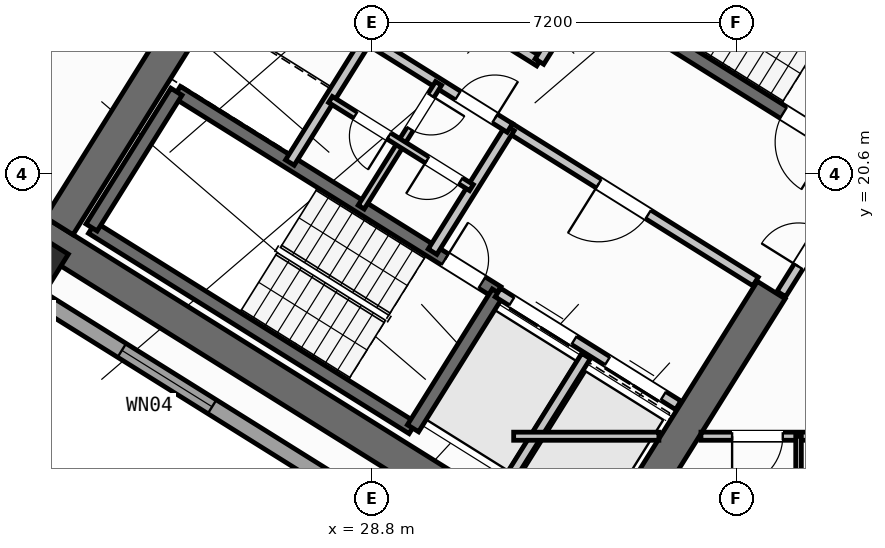
"""IFC4 building model, lengths in metres.
Left out: names, types, materials, properties, quantities, classifications, styles, units other than length and angle.
Written with IfcOpenShell. Run it as: python <this file> out.ifc"""

import sys

from ifc_helpers import new_model, si_unit, direction, frame, frame_2d, origin, origin_2d, place, context, subcontext, project, spatial, rectangle, hollow_rectangle, extrude, source, transform, mapped, element, fill, save


model = new_model("IFC4")
c1 = context("Model", 3, precision=1e-05, world=origin(), true_north=direction((0.0, 1.0)))
c2 = subcontext(c1, "Body", "Model", "MODEL_VIEW")
j1 = project(units=[si_unit("LENGTHUNIT", "METRE"), si_unit("PLANEANGLEUNIT", "RADIAN")], contexts=[c1])
p1 = place(None, origin())
s1 = spatial("IfcSite", under=j1, at=p1, CompositionType="ELEMENT")
p2 = place(p1, origin())
s2 = spatial("IfcBuilding", under=s1, at=p2, CompositionType="ELEMENT")
p3 = place(p2, frame((0.0, 0.0, 90.0)))
s3 = spatial("IfcBuildingStorey", under=s2, at=p3, CompositionType="ELEMENT", Elevation=90.0)
p4 = place(p3, frame((33.409, 12.45, 0.0), z_axis=(0.0, 0.0, 1.0), x_axis=(-0.848051132073, 0.529914405721, 0.0)))
e1 = element("IfcWall", 1, at=p4, inside=s3, PredefinedType="SHEAR", context=c2, shape_type="SweptSolid", body=[
    extrude(rectangle(XDim=13.24, YDim=0.65, at=frame_2d((6.62, 0.0))), origin(), (0.0, 0.0, 1.0), 3.35),
])
p5 = place(p3, frame((36.683, 18.304, 0.0), z_axis=(0.0, 0.0, 1.0), x_axis=(-0.529899109053, -0.848060690178, 0.0)))
e2 = element("IfcWall", 2, at=p5, inside=s3, PredefinedType="SHEAR", context=c2, shape_type="SweptSolid", body=[
    extrude(rectangle(XDim=6.375, YDim=0.65, at=frame_2d((3.188, 0.0))), origin(), (0.0, 0.0, 1.0), 3.35),
])
p6 = place(p3, frame((26.007, 24.976, 0.0), z_axis=(0.0, 0.0, 1.0), x_axis=(-0.529916319127, -0.848049936456, 0.0)))
e3 = element("IfcWall", 3, at=p6, inside=s3, PredefinedType="SHEAR", context=c2, shape_type="SweptSolid", body=[
    extrude(rectangle(XDim=6.375, YDim=0.65, at=frame_2d((3.188, 0.0))), origin(), (0.0, 0.0, 1.0), 3.35),
])
m1 = source(origin(), c2, "Body", "SweptSolid", [
    extrude(hollow_rectangle(XDim=0.9, YDim=0.9, WallThickness=0.036, at=origin_2d()), origin(), (0.0, 0.0, 1.0), 3.6),
])
p7 = place(p3, frame((22.191, 18.87, 0.0), z_axis=(0.0, 0.0, 1.0), x_axis=(-0.848048096156, 0.529919264233, 0.0)))
e4 = element("IfcColumn", 4, at=p7, inside=s3, PredefinedType="COLUMN", context=c2, shape_type="MappedRepresentation", body=[
    mapped(m1, transform((0.0, 0.0, 0.0), scale=1.0)),
])
p8 = place(p3, frame((31.76, 12.183, 0.0), z_axis=(0.0, 0.0, 1.0), x_axis=(-0.848047074256, 0.529920899612, 0.0)))
e5 = element("IfcWall", 5, at=p8, inside=s3, PredefinedType="STANDARD", context=c2, shape_type="SweptSolid", body=[
    extrude(rectangle(XDim=30.652, YDim=0.32, at=frame_2d((15.326, 0.0))), origin(), (0.0, 0.0, 1.0), 3.35),
])
p9 = place(p8, frame((15.153, 0.0, 0.0)))
e6 = element("IfcOpeningElement", 6, at=p9, cuts=e5, PredefinedType="OPENING", context=c2, shape_type="SweptSolid", body=[
    extrude(rectangle(XDim=1.2, YDim=2.15, at=frame_2d((0.6, 1.075))), frame((0.0, 0.17, 0.0), z_axis=(0.0, -1.0, 0.0), x_axis=(1.0, 0.0, 0.0)), (0.0, 0.0, 1.0), 0.34),
])
p10 = place(p8, frame((2.002, 0.0, 0.8)))
e7 = element("IfcOpeningElement", 7, at=p10, cuts=e5, PredefinedType="OPENING", context=c2, shape_type="SweptSolid", body=[
    extrude(rectangle(XDim=2.1, YDim=1.55, at=frame_2d((1.05, 0.775))), frame((0.0, 0.17, 0.0), z_axis=(0.0, -1.0, 0.0), x_axis=(1.0, 0.0, 0.0)), (0.0, 0.0, 1.0), 0.34),
])
p11 = place(p8, frame((7.206, 0.0, 0.8)))
e8 = element("IfcOpeningElement", 8, at=p11, cuts=e5, PredefinedType="OPENING", context=c2, shape_type="SweptSolid", body=[
    extrude(rectangle(XDim=2.1, YDim=1.55, at=frame_2d((1.05, 0.775))), frame((0.0, 0.17, 0.0), z_axis=(0.0, -1.0, 0.0), x_axis=(1.0, 0.0, 0.0)), (0.0, 0.0, 1.0), 0.34),
])
p12 = place(p8, frame((12.648, 0.0, 1.0)))
e9 = element("IfcOpeningElement", 9, at=p12, cuts=e5, PredefinedType="OPENING", context=c2, shape_type="SweptSolid", body=[
    extrude(rectangle(XDim=0.9, YDim=1.25, at=frame_2d((0.45, 0.625))), frame((0.0, 0.17, 0.0), z_axis=(0.0, -1.0, 0.0), x_axis=(1.0, 0.0, 0.0)), (0.0, 0.0, 1.0), 0.34),
])
p13 = place(p8, frame((27.974, 0.0, 0.95)))
e10 = element("IfcOpeningElement", 10, at=p13, cuts=e5, PredefinedType="OPENING", context=c2, shape_type="SweptSolid", body=[
    extrude(rectangle(XDim=1.2, YDim=1.4, at=frame_2d((0.6, 0.7))), frame((0.0, 0.17, 0.0), z_axis=(0.0, -1.0, 0.0), x_axis=(1.0, 0.0, 0.0)), (0.0, 0.0, 1.0), 0.34),
])
p14 = place(p8, frame((18.347, 0.0, 1.0)))
e11 = element("IfcOpeningElement", 11, at=p14, cuts=e5, PredefinedType="OPENING", context=c2, shape_type="SweptSolid", body=[
    extrude(rectangle(XDim=0.9, YDim=1.25, at=frame_2d((0.45, 0.625))), frame((0.0, 0.17, 0.0), z_axis=(0.0, -1.0, 0.0), x_axis=(1.0, 0.0, 0.0)), (0.0, 0.0, 1.0), 0.34),
])
p15 = place(p8, frame((20.931, 0.0, 1.0)))
e12 = element("IfcOpeningElement", 12, at=p15, cuts=e5, PredefinedType="OPENING", context=c2, shape_type="SweptSolid", body=[
    extrude(rectangle(XDim=0.65, YDim=1.15, at=frame_2d((0.325, 0.575))), frame((0.0, 0.17, 0.0), z_axis=(0.0, -1.0, 0.0), x_axis=(1.0, 0.0, 0.0)), (0.0, 0.0, 1.0), 0.34),
])
p16 = place(p8, frame((22.938, 0.0, 1.0)))
e13 = element("IfcOpeningElement", 13, at=p16, cuts=e5, PredefinedType="OPENING", context=c2, shape_type="SweptSolid", body=[
    extrude(rectangle(XDim=0.9, YDim=1.25, at=frame_2d((0.45, 0.625))), frame((0.0, 0.17, 0.0), z_axis=(0.0, -1.0, 0.0), x_axis=(1.0, 0.0, 0.0)), (0.0, 0.0, 1.0), 0.34),
])
p17 = place(p8, frame((25.069, 0.0, 1.0)))
e14 = element("IfcOpeningElement", 14, at=p17, cuts=e5, PredefinedType="OPENING", context=c2, shape_type="SweptSolid", body=[
    extrude(rectangle(XDim=0.9, YDim=1.25, at=frame_2d((0.45, 0.625))), frame((0.0, 0.17, 0.0), z_axis=(0.0, -1.0, 0.0), x_axis=(1.0, 0.0, 0.0)), (0.0, 0.0, 1.0), 0.34),
])
p18 = place(p3, frame((29.605, 15.581, 0.0), z_axis=(0.0, 0.0, 1.0), x_axis=(-0.848036911448, 0.529937163087, 0.0)))
e15 = element("IfcWall", 15, at=p18, inside=s3, PredefinedType="SHEAR", context=c2, shape_type="SweptSolid", body=[
    extrude(rectangle(XDim=7.46, YDim=0.26, at=frame_2d((3.73, 0.0))), origin(), (0.0, 0.0, 1.0), 3.35),
])
p19 = place(p3, frame((31.28, 18.261, 0.0), z_axis=(0.0, 0.0, 1.0), x_axis=(-0.848051618787, 0.529913626805, 0.0)))
e16 = element("IfcWall", 16, at=p19, inside=s3, PredefinedType="SHEAR", context=c2, shape_type="SweptSolid", body=[
    extrude(rectangle(XDim=7.46, YDim=0.26, at=frame_2d((3.73, 0.0))), origin(), (0.0, 0.0, 1.0), 3.35),
])
p20 = place(p19, frame((0.36, 0.0, 0.0)))
e17 = element("IfcOpeningElement", 17, at=p20, cuts=e16, PredefinedType="OPENING", context=c2, shape_type="SweptSolid", body=[
    extrude(rectangle(XDim=0.86, YDim=2.05, at=frame_2d((0.43, 1.025))), frame((0.0, 0.14, 0.0), z_axis=(0.0, -1.0, 0.0), x_axis=(1.0, 0.0, 0.0)), (0.0, 0.0, 1.0), 0.28),
])
p21 = place(p3, frame((31.288, 18.256, 0.0), z_axis=(0.0, 0.0, 1.0), x_axis=(-0.529943379326, -0.848033026897, 0.0)))
e18 = element("IfcWall", 18, at=p21, inside=s3, PredefinedType="SHEAR", context=c2, shape_type="SweptSolid", body=[
    extrude(rectangle(XDim=3.16, YDim=0.26, at=frame_2d((1.58, 0.0))), origin(), (0.0, 0.0, 1.0), 3.35),
])
p22 = place(p3, frame((24.945, 22.22, 0.0), z_axis=(0.0, 0.0, 1.0), x_axis=(-0.529908658664, -0.84805472316, 0.0)))
e19 = element("IfcWall", 19, at=p22, inside=s3, PredefinedType="SHEAR", context=c2, shape_type="SweptSolid", body=[
    extrude(rectangle(XDim=3.16, YDim=0.26, at=frame_2d((1.58, 0.0))), origin(), (0.0, 0.0, 1.0), 3.35),
])
p23 = place(p3, frame((38.046, 21.108, 0.0), z_axis=(0.0, 0.0, 1.0), x_axis=(-0.848054434086, 0.529909121291, 0.0)))
e20 = element("IfcWall", 20, at=p23, inside=s3, PredefinedType="SHEAR", context=c2, shape_type="SweptSolid", body=[
    extrude(rectangle(XDim=7.33, YDim=0.26, at=frame_2d((3.665, 0.0))), origin(), (0.0, 0.0, 1.0), 3.35),
])
p24 = place(p23, frame((0.22, 0.0, 0.0)))
e21 = element("IfcOpeningElement", 21, at=p24, cuts=e20, PredefinedType="OPENING", context=c2, shape_type="SweptSolid", body=[
    extrude(rectangle(XDim=1.1, YDim=2.1, at=frame_2d((0.55, 1.05))), frame((0.0, 0.14, 0.0), z_axis=(0.0, -1.0, 0.0), x_axis=(1.0, 0.0, 0.0)), (0.0, 0.0, 1.0), 0.28),
])
p25 = place(p3, frame((34.848, 16.031, 0.0), z_axis=(0.0, 0.0, 1.0), x_axis=(-0.848044042236, 0.529925751807, 0.0)))
e22 = element("IfcWall", 22, at=p25, inside=s3, PredefinedType="STANDARD", context=c2, shape_type="SweptSolid", body=[
    extrude(rectangle(XDim=4.198, YDim=0.2, at=frame_2d((2.099, 0.0))), origin(), (0.0, 0.0, 1.0), 3.34),
])
p26 = place(p25, frame((0.348, 0.0, 0.0)))
e23 = element("IfcOpeningElement", 23, at=p26, cuts=e22, PredefinedType="OPENING", context=c2, shape_type="SweptSolid", body=[
    extrude(rectangle(XDim=1.3, YDim=2.2, at=frame_2d((0.65, 1.1))), frame((0.0, 0.11, 0.0), z_axis=(0.0, -1.0, 0.0), x_axis=(1.0, 0.0, 0.0)), (0.0, 0.0, 1.0), 0.22),
])
p27 = place(p25, frame((2.423, 0.0, 0.0)))
e24 = element("IfcOpeningElement", 24, at=p27, cuts=e22, PredefinedType="OPENING", context=c2, shape_type="SweptSolid", body=[
    extrude(rectangle(XDim=1.45, YDim=2.25, at=frame_2d((0.725, 1.125))), frame((0.0, 0.11, 0.0), z_axis=(0.0, -1.0, 0.0), x_axis=(1.0, 0.0, 0.0)), (0.0, 0.0, 1.0), 0.22),
])
p28 = place(p3, frame((36.374, 18.474, 0.0), z_axis=(0.0, 0.0, 1.0), x_axis=(-0.848051071577, 0.529914502535, 0.0)))
e25 = element("IfcWall", 25, at=p28, inside=s3, PredefinedType="STANDARD", context=c2, shape_type="SweptSolid", body=[
    extrude(rectangle(XDim=5.718, YDim=0.2, at=frame_2d((2.859, 0.0))), origin(), (0.0, 0.0, 1.0), 3.34),
])
p29 = place(p28, frame((2.498, 0.0, 0.0)))
e26 = element("IfcOpeningElement", 26, at=p29, cuts=e25, PredefinedType="OPENING", context=c2, shape_type="SweptSolid", body=[
    extrude(rectangle(XDim=1.15, YDim=2.1, at=frame_2d((0.575, 1.05))), frame((0.0, 0.11, 0.0), z_axis=(0.0, -1.0, 0.0), x_axis=(1.0, 0.0, 0.0)), (0.0, 0.0, 1.0), 0.22),
])
p30 = place(p3, frame((32.108, 22.814, 0.0), z_axis=(0.0, 0.0, 1.0), x_axis=(-0.848042229521, 0.529928652696, 0.0)))
e27 = element("IfcWall", 27, at=p30, inside=s3, PredefinedType="STANDARD", context=c2, shape_type="SweptSolid", body=[
    extrude(rectangle(XDim=5.62, YDim=0.2, at=frame_2d((2.81, 0.0))), origin(), (0.0, 0.0, 1.0), 3.34),
])
p31 = place(p3, frame((32.982, 24.213, 0.0), z_axis=(0.0, 0.0, 1.0), x_axis=(-0.529839334948, -0.84809803628, 0.0)))
e28 = element("IfcWall", 28, at=p31, inside=s3, PredefinedType="STANDARD", context=c2, shape_type="SweptSolid", body=[
    extrude(rectangle(XDim=1.65, YDim=0.2, at=frame_2d((0.825, 0.0))), origin(), (0.0, 0.0, 1.0), 3.34),
])
p32 = place(p3, frame((33.029, 17.003, 0.0), z_axis=(0.0, 0.0, 1.0), x_axis=(-0.529916267533, -0.848049968695, 0.0)))
e29 = element("IfcWall", 29, at=p32, inside=s3, PredefinedType="STANDARD", context=c2, shape_type="SweptSolid", body=[
    extrude(rectangle(XDim=2.92, YDim=0.2, at=frame_2d((1.46, 0.0))), origin(), (0.0, 0.0, 1.0), 3.34),
])
for number, where, z_axis, x_axis in (
    (30, (31.525, 21.504, 0.0), (0.0, 0.0, 1.0), (-0.53, -0.848, 0.0)),
    (31, (28.71, 23.263, 0.0), (0.0, 0.0, 1.0), (-0.53, -0.848, 0.0)),
):
    element("IfcWall", number, at=place(p3, frame(where, z_axis=z_axis, x_axis=x_axis)), inside=s3, PredefinedType="STANDARD", context=c2, shape_type="SweptSolid", body=[
        extrude(rectangle(XDim=2.88, YDim=0.2, at=frame_2d((1.44, 0.0))), origin(), (0.0, 0.0, 1.0), 3.34),
    ])
p33 = place(p3, frame((31.525, 21.504, 0.0), z_axis=(0.0, 0.0, 1.0), x_axis=(-0.848044998614, 0.529924221305, 0.0)))
e32 = element("IfcWall", 32, at=p33, inside=s3, PredefinedType="STANDARD", context=c2, shape_type="SweptSolid", body=[
    extrude(rectangle(XDim=6.168, YDim=0.2, at=frame_2d((3.084, 0.0))), origin(), (0.0, 0.0, 1.0), 3.34),
])
p34 = place(p33, frame((4.4, 0.0, 0.0)))
e33 = element("IfcOpeningElement", 33, at=p34, cuts=e32, PredefinedType="OPENING", context=c2, shape_type="SweptSolid", body=[
    extrude(rectangle(XDim=0.86, YDim=2.05, at=frame_2d((0.43, 1.025))), frame((0.0, 0.11, 0.0), z_axis=(0.0, -1.0, 0.0), x_axis=(1.0, 0.0, 0.0)), (0.0, 0.0, 1.0), 0.22),
])
p35 = place(p33, frame((0.35, 0.0, 0.0)))
e34 = element("IfcOpeningElement", 34, at=p35, cuts=e32, PredefinedType="OPENING", context=c2, shape_type="SweptSolid", body=[
    extrude(rectangle(XDim=0.86, YDim=2.05, at=frame_2d((0.43, 1.025))), frame((0.0, 0.11, 0.0), z_axis=(0.0, -1.0, 0.0), x_axis=(1.0, 0.0, 0.0)), (0.0, 0.0, 1.0), 0.22),
])
p36 = place(p3, frame((30.117, 22.384, 0.0), z_axis=(0.0, 0.0, 1.0), x_axis=(-0.529951914384, -0.848027693204, 0.0)))
e35 = element("IfcWall", 35, at=p36, inside=s3, PredefinedType="PLUMBINGWALL", context=c2, shape_type="SweptSolid", body=[
    extrude(rectangle(XDim=1.4, YDim=0.14, at=frame_2d((0.7, 0.0))), origin(), (0.0, 0.0, 1.0), 3.34),
])
p37 = place(p36, frame((0.28, 0.0, 0.0)))
e36 = element("IfcOpeningElement", 36, at=p37, cuts=e35, PredefinedType="OPENING", context=c2, shape_type="SweptSolid", body=[
    extrude(rectangle(XDim=0.78, YDim=2.05, at=frame_2d((0.39, 1.025))), frame((0.0, 0.08, 0.0), z_axis=(0.0, -1.0, 0.0), x_axis=(1.0, 0.0, 0.0)), (0.0, 0.0, 1.0), 0.16),
])
p38 = place(p3, frame((29.375, 21.196, 0.0), z_axis=(0.0, 0.0, 1.0), x_axis=(-0.529865479138, -0.848081702443, 0.0)))
e37 = element("IfcWall", 37, at=p38, inside=s3, PredefinedType="PLUMBINGWALL", context=c2, shape_type="SweptSolid", body=[
    extrude(rectangle(XDim=1.48, YDim=0.14, at=frame_2d((0.74, 0.0))), origin(), (0.0, 0.0, 1.0), 3.34),
])
p39 = place(p3, frame((30.766, 20.327, 0.0), z_axis=(0.0, 0.0, 1.0), x_axis=(-0.848052663127, 0.529911955482, 0.0)))
e38 = element("IfcWall", 38, at=p39, inside=s3, PredefinedType="PLUMBINGWALL", context=c2, shape_type="SweptSolid", body=[
    extrude(rectangle(XDim=3.28, YDim=0.14, at=frame_2d((1.64, 0.0))), origin(), (0.0, 0.0, 1.0), 3.34),
])
p40 = place(p39, frame((0.25, 0.0, 0.0)))
e39 = element("IfcOpeningElement", 39, at=p40, cuts=e38, PredefinedType="OPENING", context=c2, shape_type="SweptSolid", body=[
    extrude(rectangle(XDim=0.78, YDim=2.05, at=frame_2d((0.39, 1.025))), frame((0.0, 0.08, 0.0), z_axis=(0.0, -1.0, 0.0), x_axis=(1.0, 0.0, 0.0)), (0.0, 0.0, 1.0), 0.16),
])
p41 = place(p39, frame((1.92, 0.0, 0.0)))
e40 = element("IfcOpeningElement", 40, at=p41, cuts=e38, PredefinedType="OPENING", context=c2, shape_type="SweptSolid", body=[
    extrude(rectangle(XDim=0.78, YDim=2.05, at=frame_2d((0.39, 1.025))), frame((0.0, 0.08, 0.0), z_axis=(0.0, -1.0, 0.0), x_axis=(1.0, 0.0, 0.0)), (0.0, 0.0, 1.0), 0.16),
])
p42 = place(p3, frame((25.807, 29.582, 0.0), z_axis=(0.0, 0.0, 1.0), x_axis=(-0.529920357077, -0.848047413271, 0.0)))
e41 = element("IfcWall", 41, at=p42, inside=s3, PredefinedType="PARTITIONING", context=c2, shape_type="SweptSolid", body=[
    extrude(rectangle(XDim=11.45, YDim=0.16, at=frame_2d((5.725, 0.0))), origin(), (0.0, 0.0, 1.0), 3.34),
])
p43 = place(p3, frame((38.451, 20.737, 0.0), z_axis=(0.0, 0.0, 1.0), x_axis=(-0.529924799939, -0.848044637038, 0.0)))
e42 = element("IfcWall", 42, at=p43, inside=s3, PredefinedType="STANDARD", context=c2, shape_type="SweptSolid", body=[
    extrude(rectangle(XDim=2.96, YDim=0.2, at=frame_2d((1.48, 0.0))), origin(), (0.0, 0.0, 1.0), 3.34),
])
p44 = place(p43, frame((1.46, 0.0, 0.0)))
e43 = element("IfcOpeningElement", 43, at=p44, cuts=e42, PredefinedType="OPENING", context=c2, shape_type="SweptSolid", body=[
    extrude(rectangle(XDim=0.86, YDim=2.05, at=frame_2d((0.43, 1.025))), frame((0.0, 0.11, 0.0), z_axis=(0.0, -1.0, 0.0), x_axis=(1.0, 0.0, 0.0)), (0.0, 0.0, 1.0), 0.22),
])
p45 = place(p3, frame((31.6, 15.42, 0.0), z_axis=(0.0, 0.0, 1.0), x_axis=(1.0, 0.0, 0.0)))
e44 = element("IfcWall", 44, at=p45, inside=s3, PredefinedType="PARTITIONING", context=c2, shape_type="SweptSolid", body=[
    extrude(rectangle(XDim=2.866, YDim=0.16, at=frame_2d((1.433, 0.0))), origin(), (0.0, 0.0, 1.0), 3.34),
])
p46 = place(p3, frame((35.296, 15.42, 0.0), z_axis=(0.0, 0.0, 1.0), x_axis=(1.0, 0.0, 0.0)))
e45 = element("IfcWall", 45, at=p46, inside=s3, PredefinedType="PARTITIONING", context=c2, shape_type="SweptSolid", body=[
    extrude(rectangle(XDim=15.311, YDim=0.16, at=frame_2d((7.655, 0.0))), origin(), (0.0, 0.0, 1.0), 3.34),
])
p47 = place(p46, frame((0.615, 0.0, 0.0)))
e46 = element("IfcOpeningElement", 46, at=p47, cuts=e45, PredefinedType="OPENING", context=c2, shape_type="SweptSolid", body=[
    extrude(rectangle(XDim=1.0, YDim=2.1, at=frame_2d((0.5, 1.05))), frame((0.0, 0.09, 0.0), z_axis=(0.0, -1.0, 0.0), x_axis=(1.0, 0.0, 0.0)), (0.0, 0.0, 1.0), 0.18),
])
p48 = place(p46, frame((9.035, 0.0, 0.0)))
e47 = element("IfcOpeningElement", 47, at=p48, cuts=e45, PredefinedType="OPENING", context=c2, shape_type="SweptSolid", body=[
    extrude(rectangle(XDim=1.0, YDim=2.1, at=frame_2d((0.5, 1.05))), frame((0.0, 0.09, 0.0), z_axis=(0.0, -1.0, 0.0), x_axis=(1.0, 0.0, 0.0)), (0.0, 0.0, 1.0), 0.18),
])
p49 = place(p3, frame((37.222, 1.96, 0.0), z_axis=(0.0, 0.0, 1.0), x_axis=(0.0, 1.0, 0.0)))
e48 = element("IfcWall", 48, at=p49, inside=s3, PredefinedType="PARTITIONING", context=c2, shape_type="SweptSolid", body=[
    extrude(rectangle(XDim=13.46, YDim=0.11, at=frame_2d((6.73, 0.0))), origin(), (0.0, 0.0, 1.0), 3.34),
])
p50 = place(p49, frame((5.2, 0.0, 0.0)))
e49 = element("IfcOpeningElement", 49, at=p50, cuts=e48, PredefinedType="OPENING", context=c2, shape_type="SweptSolid", body=[
    extrude(rectangle(XDim=0.92, YDim=2.08, at=frame_2d((0.46, 1.04))), frame((0.0, 0.065, 0.0), z_axis=(0.0, -1.0, 0.0), x_axis=(1.0, 0.0, 0.0)), (0.0, 0.0, 1.0), 0.13),
])
p51 = place(p49, frame((10.89, 0.0, 0.0)))
e50 = element("IfcOpeningElement", 50, at=p51, cuts=e48, PredefinedType="OPENING", context=c2, shape_type="SweptSolid", body=[
    extrude(rectangle(XDim=0.88, YDim=2.08, at=frame_2d((0.44, 1.04))), frame((0.0, 0.065, 0.0), z_axis=(0.0, -1.0, 0.0), x_axis=(1.0, 0.0, 0.0)), (0.0, 0.0, 1.0), 0.13),
])
m2 = source(origin(), c2, "Body", "SweptSolid", [
    extrude(rectangle(XDim=2.1, YDim=1.55, at=frame_2d((1.05, 0.775))), frame((0.0, 0.03, 0.0), z_axis=(0.0, -1.0, 0.0), x_axis=(1.0, 0.0, 0.0)), (0.0, 0.0, 1.0), 0.06),
])
p52 = place(p11, origin())
e51 = element("IfcWindow", 51, at=p52, inside=s3, PartitioningType="SINGLE_PANEL", PredefinedType="WINDOW", context=c2, shape_type="MappedRepresentation", body=[
    mapped(m2, transform((0.0, 0.0, 0.0), scale=1.0)),
])
fill(e8, e51)
m3 = source(origin(), c2, "Body", "SweptSolid", [
    extrude(rectangle(XDim=0.86, YDim=2.05, at=frame_2d((0.43, 1.025))), frame((0.0, 0.025, 0.0), z_axis=(0.0, -1.0, 0.0), x_axis=(1.0, 0.0, 0.0)), (0.0, 0.0, 1.0), 0.05),
])
p53 = place(p20, frame((0.86, 0.0, 0.0), z_axis=(0.0, 0.0, 1.0), x_axis=(-1.0, 0.0, 0.0)))
e52 = element("IfcDoor", 52, at=p53, inside=s3, OperationType="SINGLE_SWING_LEFT", PredefinedType="DOOR", context=c2, shape_type="MappedRepresentation", body=[
    mapped(m3, transform((0.0, 0.0, 0.0), scale=1.0)),
])
fill(e17, e52)
m4 = source(origin(), c2, "Body", "SweptSolid", [
    extrude(rectangle(XDim=1.1, YDim=2.1, at=frame_2d((0.55, 1.05))), frame((0.0, 0.025, 0.0), z_axis=(0.0, -1.0, 0.0), x_axis=(1.0, 0.0, 0.0)), (0.0, 0.0, 1.0), 0.05),
])
p54 = place(p24, origin())
e53 = element("IfcDoor", 53, at=p54, inside=s3, OperationType="SINGLE_SWING_LEFT", PredefinedType="DOOR", context=c2, shape_type="MappedRepresentation", body=[
    mapped(m4, transform((0.0, 0.0, 0.0), scale=1.0)),
])
fill(e21, e53)
m5 = source(origin(), c2, "Body", "SweptSolid", [
    extrude(rectangle(XDim=1.15, YDim=2.1, at=frame_2d((0.575, 1.05))), frame((0.0, 0.025, 0.0), z_axis=(0.0, -1.0, 0.0), x_axis=(1.0, 0.0, 0.0)), (0.0, 0.0, 1.0), 0.05),
])
p55 = place(p29, origin())
e54 = element("IfcDoor", 54, at=p55, inside=s3, OperationType="SINGLE_SWING_RIGHT", PredefinedType="DOOR", context=c2, shape_type="MappedRepresentation", body=[
    mapped(m5, transform((0.0, 0.0, 0.0), scale=1.0)),
])
fill(e26, e54)
m6 = source(origin(), c2, "Body", "SweptSolid", [
    extrude(rectangle(XDim=1.3, YDim=2.2, at=frame_2d((0.65, 1.1))), frame((0.0, 0.025, 0.0), z_axis=(0.0, -1.0, 0.0), x_axis=(1.0, 0.0, 0.0)), (0.0, 0.0, 1.0), 0.05),
])
p56 = place(p26, origin())
e55 = element("IfcDoor", 55, at=p56, inside=s3, OperationType="DOUBLE_DOOR_SLIDING", PredefinedType="DOOR", context=c2, shape_type="MappedRepresentation", body=[
    mapped(m6, transform((0.0, 0.0, 0.0), scale=1.0)),
])
fill(e23, e55)
m7 = source(origin(), c2, "Body", "SweptSolid", [
    extrude(rectangle(XDim=1.45, YDim=2.25, at=frame_2d((0.725, 1.125))), frame((0.0, 0.025, 0.0), z_axis=(0.0, -1.0, 0.0), x_axis=(1.0, 0.0, 0.0)), (0.0, 0.0, 1.0), 0.05),
])
p57 = place(p27, origin())
e56 = element("IfcDoor", 56, at=p57, inside=s3, OperationType="DOUBLE_DOOR_SLIDING", PredefinedType="DOOR", context=c2, shape_type="MappedRepresentation", body=[
    mapped(m7, transform((0.0, 0.0, 0.0), scale=1.0)),
])
fill(e24, e56)
p58 = place(p35, frame((0.86, 0.0, 0.0), z_axis=(0.0, 0.0, 1.0), x_axis=(-1.0, 0.0, 0.0)))
e57 = element("IfcDoor", 57, at=p58, inside=s3, OperationType="SINGLE_SWING_RIGHT", PredefinedType="DOOR", context=c2, shape_type="MappedRepresentation", body=[
    mapped(m3, transform((0.0, 0.0, 0.0), scale=1.0)),
])
fill(e34, e57)
m8 = source(origin(), c2, "Body", "SweptSolid", [
    extrude(rectangle(XDim=0.78, YDim=2.05, at=frame_2d((0.39, 1.025))), frame((0.0, 0.025, 0.0), z_axis=(0.0, -1.0, 0.0), x_axis=(1.0, 0.0, 0.0)), (0.0, 0.0, 1.0), 0.05),
])
p59 = place(p37, origin())
e58 = element("IfcDoor", 58, at=p59, inside=s3, OperationType="SINGLE_SWING_LEFT", PredefinedType="DOOR", context=c2, shape_type="MappedRepresentation", body=[
    mapped(m8, transform((0.0, 0.0, 0.0), scale=1.0)),
])
fill(e36, e58)
p60 = place(p40, origin())
e59 = element("IfcDoor", 59, at=p60, inside=s3, OperationType="SINGLE_SWING_RIGHT", PredefinedType="DOOR", context=c2, shape_type="MappedRepresentation", body=[
    mapped(m8, transform((0.0, 0.0, 0.0), scale=1.0)),
])
fill(e39, e59)
p61 = place(p41, origin())
e60 = element("IfcDoor", 60, at=p61, inside=s3, OperationType="SINGLE_SWING_LEFT", PredefinedType="DOOR", context=c2, shape_type="MappedRepresentation", body=[
    mapped(m8, transform((0.0, 0.0, 0.0), scale=1.0)),
])
fill(e40, e60)
p62 = place(p44, frame((0.86, 0.0, 0.0), z_axis=(0.0, 0.0, 1.0), x_axis=(-1.0, 0.0, 0.0)))
e61 = element("IfcDoor", 61, at=p62, inside=s3, OperationType="SINGLE_SWING_LEFT", PredefinedType="DOOR", context=c2, shape_type="MappedRepresentation", body=[
    mapped(m3, transform((0.0, 0.0, 0.0), scale=1.0)),
])
fill(e43, e61)
m9 = source(origin(), c2, "Body", "SweptSolid", [
    extrude(rectangle(XDim=1.0, YDim=2.1, at=frame_2d((0.5, 1.05))), frame((0.0, 0.025, 0.0), z_axis=(0.0, -1.0, 0.0), x_axis=(1.0, 0.0, 0.0)), (0.0, 0.0, 1.0), 0.05),
])
p63 = place(p47, frame((1.0, 0.0, 0.0), z_axis=(0.0, 0.0, 1.0), x_axis=(-1.0, 0.0, 0.0)))
e62 = element("IfcDoor", 62, at=p63, inside=s3, OperationType="SINGLE_SWING_RIGHT", PredefinedType="DOOR", context=c2, shape_type="MappedRepresentation", body=[
    mapped(m9, transform((0.0, 0.0, 0.0), scale=1.0)),
])
fill(e46, e62)
save(model, sys.argv[1])
